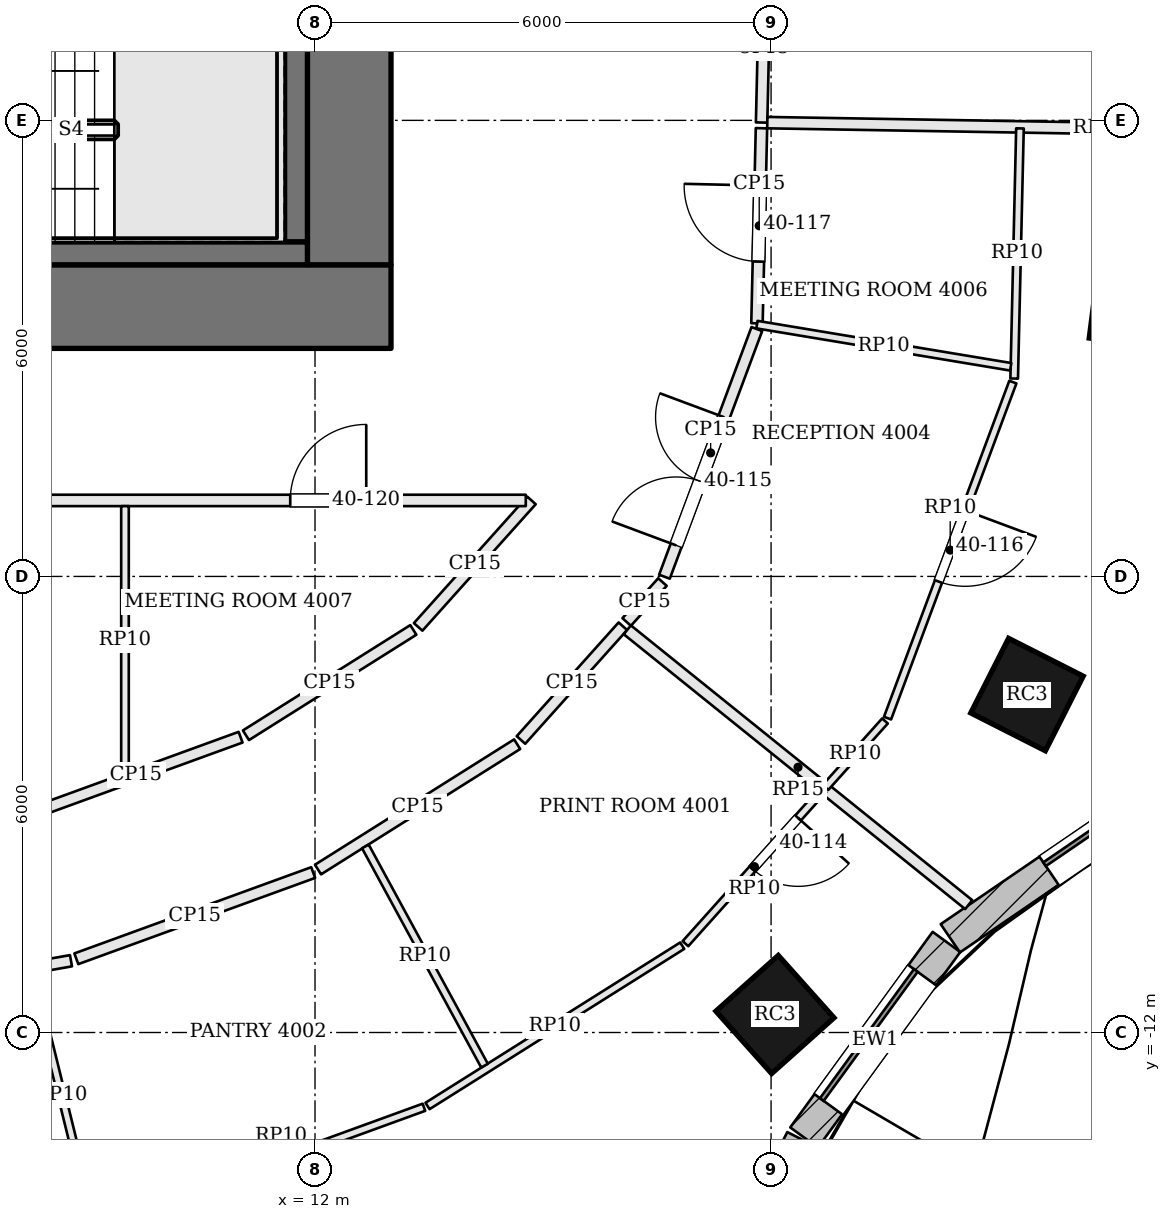
"""IFC4 building model, lengths in metres.
Left out: names, types, materials, properties, quantities, classifications, styles, units other than length and angle.
Written with IfcOpenShell. Run it as: python <this file> out.ifc"""

import sys

from ifc_helpers import new_model, si_unit, direction, frame, frame_2d, origin, origin_2d, place, context, subcontext, project, spatial, rectangle, extrude, element, fill, save


model = new_model("IFC4")
c1 = context("Model", 3, precision=1e-05, world=origin(), true_north=direction((0.0, 1.0)))
c2 = subcontext(c1, "Body", "Model", "MODEL_VIEW")
j1 = project(units=[si_unit("LENGTHUNIT", "METRE"), si_unit("PLANEANGLEUNIT", "RADIAN")], contexts=[c1])
p1 = place(None, origin())
s1 = spatial("IfcSite", under=j1, at=p1, CompositionType="ELEMENT")
p2 = place(p1, origin())
s2 = spatial("IfcBuilding", under=s1, at=p2, CompositionType="ELEMENT")
p3 = place(p2, frame((0.0, 0.0, 165.6)))
s3 = spatial("IfcBuildingStorey", under=s2, at=p3, CompositionType="ELEMENT", Elevation=165.6)
p4 = place(p3, frame((-13.0, -2.45, 0.0), z_axis=(0.0, 0.0, 1.0), x_axis=(1.0, 0.0, 0.0)))
e1 = element("IfcWall", 1, at=p4, inside=s3, PredefinedType="SHEAR", context=c2, shape_type="SweptSolid", body=[
    extrude(rectangle(XDim=26.0, YDim=1.1, at=frame_2d((13.0, 0.0))), origin(), (0.0, 0.0, 1.0), 3.9),
])
p5 = place(p4, frame((9.275, 0.0, 0.0)))
e2 = element("IfcOpeningElement", 2, at=p5, cuts=e1, PredefinedType="OPENING", context=c2, shape_type="SweptSolid", body=[
    extrude(rectangle(XDim=0.9, YDim=2.1, at=frame_2d((0.45, 1.05))), frame((0.0, 0.56, 0.0), z_axis=(0.0, -1.0, 0.0), x_axis=(1.0, 0.0, 0.0)), (0.0, 0.0, 1.0), 1.12),
])
p6 = place(p4, frame((12.525, 0.0, 0.0)))
e3 = element("IfcOpeningElement", 3, at=p6, cuts=e1, PredefinedType="OPENING", context=c2, shape_type="SweptSolid", body=[
    extrude(rectangle(XDim=0.9, YDim=2.1, at=frame_2d((0.45, 1.05))), frame((0.0, 0.56, 0.0), z_axis=(0.0, -1.0, 0.0), x_axis=(1.0, 0.0, 0.0)), (0.0, 0.0, 1.0), 1.12),
])
p7 = place(p4, frame((15.0, 0.0, 0.0)))
e4 = element("IfcOpeningElement", 4, at=p7, cuts=e1, PredefinedType="OPENING", context=c2, shape_type="SweptSolid", body=[
    extrude(rectangle(XDim=1.0, YDim=2.1, at=frame_2d((0.5, 1.05))), frame((0.0, 0.56, 0.0), z_axis=(0.0, -1.0, 0.0), x_axis=(1.0, 0.0, 0.0)), (0.0, 0.0, 1.0), 1.12),
])
p8 = place(p4, frame((16.7, 0.0, 0.0)))
e5 = element("IfcOpeningElement", 5, at=p8, cuts=e1, PredefinedType="OPENING", context=c2, shape_type="SweptSolid", body=[
    extrude(rectangle(XDim=0.9, YDim=2.1, at=frame_2d((0.45, 1.05))), frame((0.0, 0.56, 0.0), z_axis=(0.0, -1.0, 0.0), x_axis=(1.0, 0.0, 0.0)), (0.0, 0.0, 1.0), 1.12),
])
p9 = place(p3, frame((12.45, -1.9, 0.0), z_axis=(0.0, 0.0, 1.0), x_axis=(0.0, 1.0, 0.0)))
e6 = element("IfcWall", 6, at=p9, inside=s3, PredefinedType="SHEAR", context=c2, shape_type="SweptSolid", body=[
    extrude(rectangle(XDim=12.8, YDim=1.1, at=frame_2d((6.4, 0.0))), origin(), (0.0, 0.0, 1.0), 3.9),
])
p10 = place(p9, frame((7.1, 0.0, 0.0)))
e7 = element("IfcOpeningElement", 7, at=p10, cuts=e6, PredefinedType="OPENING", context=c2, shape_type="SweptSolid", body=[
    extrude(rectangle(XDim=1.8, YDim=2.1, at=frame_2d((0.9, 1.05))), frame((0.0, 0.56, 0.0), z_axis=(0.0, -1.0, 0.0), x_axis=(1.0, 0.0, 0.0)), (0.0, 0.0, 1.0), 1.12),
])
for number, where, z_axis, x_axis in (
    (8, (18.051, -11.763, 0.0), (0.0, 0.0, 1.0), (0.746, 0.666, 0.0)),
    (9, (21.367, -7.554, 0.0), (0.0, 0.0, 1.0), (0.452, 0.892, 0.0)),
    (10, (22.802, -2.389, 0.0), (0.0, 0.0, 1.0), (0.129, 0.992, 0.0)),
):
    element("IfcColumn", number, at=place(p3, frame(where, z_axis=z_axis, x_axis=x_axis)), inside=s3, PredefinedType="COLUMN", context=c2, shape_type="SweptSolid", body=[
        extrude(rectangle(XDim=1.1, YDim=1.1, at=origin_2d()), origin(), (0.0, 0.0, 1.0), 3.1),
    ])
p11 = place(p3, frame((16.697, -16.788, 0.0), z_axis=(0.0, 0.0, 1.0), x_axis=(0.453390768189, 0.891311848525, 0.0)))
e11 = element("IfcWall", 11, at=p11, inside=s3, PredefinedType="SOLIDWALL", context=c2, shape_type="SweptSolid", body=[
    extrude(rectangle(XDim=3.788, YDim=0.45, at=frame_2d((1.894, 0.0))), origin(), (0.0, 0.0, 1.0), 3.6),
])
p12 = place(p11, frame((0.844, 0.0, 0.9)))
e12 = element("IfcOpeningElement", 12, at=p12, cuts=e11, PredefinedType="OPENING", context=c2, shape_type="SweptSolid", body=[
    extrude(rectangle(XDim=2.1, YDim=1.8, at=frame_2d((1.05, 0.9))), frame((0.0, 0.235, 0.0), z_axis=(0.0, -1.0, 0.0), x_axis=(1.0, 0.0, 0.0)), (0.0, 0.0, 1.0), 0.47),
])
p13 = place(p3, frame((18.434, -13.381, 0.0), z_axis=(0.0, 0.0, 1.0), x_axis=(0.58867331001, 0.808371037384, 0.0)))
e13 = element("IfcWall", 13, at=p13, inside=s3, PredefinedType="SOLIDWALL", context=c2, shape_type="SweptSolid", body=[
    extrude(rectangle(XDim=3.183, YDim=0.45, at=frame_2d((1.591, 0.0))), origin(), (0.0, 0.0, 1.0), 3.6),
])
p14 = place(p13, frame((0.541, 0.0, 0.9)))
e14 = element("IfcOpeningElement", 14, at=p14, cuts=e13, PredefinedType="OPENING", context=c2, shape_type="SweptSolid", body=[
    extrude(rectangle(XDim=2.1, YDim=1.8, at=frame_2d((1.05, 0.9))), frame((0.0, 0.235, 0.0), z_axis=(0.0, -1.0, 0.0), x_axis=(1.0, 0.0, 0.0)), (0.0, 0.0, 1.0), 0.47),
])
p15 = place(p3, frame((20.359, -10.76, 0.0), z_axis=(0.0, 0.0, 1.0), x_axis=(0.825616460661, 0.564231743068, 0.0)))
e15 = element("IfcWall", 15, at=p15, inside=s3, PredefinedType="SOLIDWALL", context=c2, shape_type="SweptSolid", body=[
    extrude(rectangle(XDim=5.246, YDim=0.45, at=frame_2d((2.623, 0.0))), origin(), (0.0, 0.0, 1.0), 3.6),
])
p16 = place(p15, frame((1.573, 0.0, 0.9)))
e16 = element("IfcOpeningElement", 16, at=p16, cuts=e15, PredefinedType="OPENING", context=c2, shape_type="SweptSolid", body=[
    extrude(rectangle(XDim=2.1, YDim=1.8, at=frame_2d((1.05, 0.9))), frame((0.0, 0.235, 0.0), z_axis=(0.0, -1.0, 0.0), x_axis=(1.0, 0.0, 0.0)), (0.0, 0.0, 1.0), 0.47),
])
p17 = place(p3, frame((11.75, 1.35, 0.0), z_axis=(0.0, 0.0, 1.0), x_axis=(0.0, -1.0, 0.0)))
e17 = element("IfcWall", 17, at=p17, inside=s3, PredefinedType="SOLIDWALL", context=c2, shape_type="SweptSolid", body=[
    extrude(rectangle(XDim=2.95, YDim=0.3, at=frame_2d((1.475, 0.0))), origin(), (0.0, 0.0, 1.0), 3.6),
])
p18 = place(p3, frame((11.9, -1.75, 0.0), z_axis=(0.0, 0.0, 1.0), x_axis=(-1.0, 0.0, 0.0)))
e18 = element("IfcWall", 18, at=p18, inside=s3, PredefinedType="SOLIDWALL", context=c2, shape_type="SweptSolid", body=[
    extrude(rectangle(XDim=6.8, YDim=0.3, at=frame_2d((3.4, 0.0))), origin(), (0.0, 0.0, 1.0), 3.6),
])
p19 = place(p3, frame((17.875, -0.028, 0.0), z_axis=(0.0, 0.0, 1.0), x_axis=(0.023087091456, 0.999733457582, 0.0)))
e19 = element("IfcWall", 19, at=p19, inside=s3, PredefinedType="PARTITIONING", context=c2, shape_type="SweptSolid", body=[
    extrude(rectangle(XDim=1.956, YDim=0.15, at=frame_2d((0.978, 0.0))), origin(), (0.0, 0.0, 1.0), 3.098),
])
p20 = place(p3, frame((26.677, -0.177, 0.0), z_axis=(0.0, 0.0, 1.0), x_axis=(-0.999857756393, 0.016866148966, 0.0)))
e20 = element("IfcWall", 20, at=p20, inside=s3, PredefinedType="PARTITIONING", context=c2, shape_type="SweptSolid", body=[
    extrude(rectangle(XDim=8.729, YDim=0.15, at=frame_2d((4.364, 0.0))), origin(), (0.0, 0.0, 1.0), 3.19),
])
p21 = place(p3, frame((4.594, -11.799, 0.0), z_axis=(0.0, 0.0, 1.0), x_axis=(0.984693444773, 0.174295208833, 0.0)))
e21 = element("IfcWall", 21, at=p21, inside=s3, PredefinedType="PARTITIONING", context=c2, shape_type="SweptSolid", body=[
    extrude(rectangle(XDim=4.261, YDim=0.15, at=frame_2d((2.13, 0.0))), origin(), (0.0, 0.0, 1.0), 3.098),
])
p22 = place(p21, frame((0.45, 0.0, 0.0)))
e22 = element("IfcOpeningElement", 22, at=p22, cuts=e21, PredefinedType="OPENING", context=c2, shape_type="SweptSolid", body=[
    extrude(rectangle(XDim=1.0, YDim=2.4, at=frame_2d((0.5, 1.2))), frame((0.0, 0.085, 0.0), z_axis=(0.0, -1.0, 0.0), x_axis=(1.0, 0.0, 0.0)), (0.0, 0.0, 1.0), 0.17),
])
p23 = place(p3, frame((8.86, -11.03, 0.0), z_axis=(0.0, 0.0, 1.0), x_axis=(0.939685902536, 0.342038601001, 0.0)))
e23 = element("IfcWall", 23, at=p23, inside=s3, PredefinedType="PARTITIONING", context=c2, shape_type="SweptSolid", body=[
    extrude(rectangle(XDim=3.316, YDim=0.15, at=frame_2d((1.658, 0.0))), origin(), (0.0, 0.0, 1.0), 3.098),
])
p24 = place(p3, frame((12.04, -9.856, 0.0), z_axis=(0.0, 0.0, 1.0), x_axis=(0.846394809937, 0.532555936697, 0.0)))
e24 = element("IfcWall", 24, at=p24, inside=s3, PredefinedType="PARTITIONING", context=c2, shape_type="SweptSolid", body=[
    extrude(rectangle(XDim=3.095, YDim=0.15, at=frame_2d((1.548, 0.0))), origin(), (0.0, 0.0, 1.0), 3.098),
])
p25 = place(p3, frame((14.709, -8.152, 0.0), z_axis=(0.0, 0.0, 1.0), x_axis=(0.667345221437, 0.744748518243, 0.0)))
e25 = element("IfcWall", 25, at=p25, inside=s3, PredefinedType="PARTITIONING", context=c2, shape_type="SweptSolid", body=[
    extrude(rectangle(XDim=2.009, YDim=0.15, at=frame_2d((1.005, 0.0))), origin(), (0.0, 0.0, 1.0), 3.098),
])
p26 = place(p3, frame((20.6, -10.318, 0.0), z_axis=(0.0, 0.0, 1.0), x_axis=(-0.778973348429, 0.627057032842, 0.0)))
e26 = element("IfcWall", 26, at=p26, inside=s3, PredefinedType="PARTITIONING", context=c2, shape_type="SweptSolid", body=[
    extrude(rectangle(XDim=5.766, YDim=0.15, at=frame_2d((2.883, 0.0))), origin(), (0.0, 0.0, 1.0), 3.19),
])
p27 = place(p3, frame((16.1, -6.599, 0.0), z_axis=(0.0, 0.0, 1.0), x_axis=(0.667300297025, 0.744788771122, 0.0)))
e27 = element("IfcWall", 27, at=p27, inside=s3, PredefinedType="PARTITIONING", context=c2, shape_type="SweptSolid", body=[
    extrude(rectangle(XDim=0.706, YDim=0.15, at=frame_2d((0.353, 0.0))), origin(), (0.0, 0.0, 1.0), 3.098),
])
p28 = place(p3, frame((16.597, -6.003, 0.0), z_axis=(0.0, 0.0, 1.0), x_axis=(0.349499455299, 0.936936567088, 0.0)))
e28 = element("IfcWall", 28, at=p28, inside=s3, PredefinedType="PARTITIONING", context=c2, shape_type="SweptSolid", body=[
    extrude(rectangle(XDim=3.477, YDim=0.15, at=frame_2d((1.739, 0.0))), origin(), (0.0, 0.0, 1.0), 3.098),
])
p29 = place(p28, frame((0.44, 0.0, 0.0)))
e29 = element("IfcOpeningElement", 29, at=p29, cuts=e28, PredefinedType="OPENING", context=c2, shape_type="SweptSolid", body=[
    extrude(rectangle(XDim=1.8, YDim=2.1, at=frame_2d((0.9, 1.05))), frame((0.0, 0.085, 0.0), z_axis=(0.0, -1.0, 0.0), x_axis=(1.0, 0.0, 0.0)), (0.0, 0.0, 1.0), 0.17),
])
p30 = place(p3, frame((17.814, -2.67, 0.0), z_axis=(0.0, 0.0, 1.0), x_axis=(0.023010835286, 0.999735215674, 0.0)))
e30 = element("IfcWall", 30, at=p30, inside=s3, PredefinedType="PARTITIONING", context=c2, shape_type="SweptSolid", body=[
    extrude(rectangle(XDim=2.568, YDim=0.15, at=frame_2d((1.284, 0.0))), origin(), (0.0, 0.0, 1.0), 3.098),
])
p31 = place(p30, frame((0.813, 0.0, 0.0)))
e31 = element("IfcOpeningElement", 31, at=p31, cuts=e30, PredefinedType="OPENING", context=c2, shape_type="SweptSolid", body=[
    extrude(rectangle(XDim=1.0, YDim=2.4, at=frame_2d((0.5, 1.2))), frame((0.0, 0.085, 0.0), z_axis=(0.0, -1.0, 0.0), x_axis=(1.0, 0.0, 0.0)), (0.0, 0.0, 1.0), 0.17),
])
p32 = place(p3, frame((14.848, -5.0, 0.0), z_axis=(0.0, 0.0, 1.0), x_axis=(-0.667363249373, -0.744732363595, 0.0)))
e32 = element("IfcWall", 32, at=p32, inside=s3, PredefinedType="PARTITIONING", context=c2, shape_type="SweptSolid", body=[
    extrude(rectangle(XDim=2.234, YDim=0.15, at=frame_2d((1.117, 0.0))), origin(), (0.0, 0.0, 1.0), 3.098),
])
p33 = place(p3, frame((13.293, -6.704, 0.0), z_axis=(0.0, 0.0, 1.0), x_axis=(-0.84641299998, -0.532527026041, 0.0)))
e33 = element("IfcWall", 33, at=p33, inside=s3, PredefinedType="PARTITIONING", context=c2, shape_type="SweptSolid", body=[
    extrude(rectangle(XDim=2.602, YDim=0.15, at=frame_2d((1.301, 0.0))), origin(), (0.0, 0.0, 1.0), 3.098),
])
p34 = place(p3, frame((11.021, -8.115, 0.0), z_axis=(0.0, 0.0, 1.0), x_axis=(-0.939683845313, -0.342044252778, 0.0)))
e34 = element("IfcWall", 34, at=p34, inside=s3, PredefinedType="PARTITIONING", context=c2, shape_type="SweptSolid", body=[
    extrude(rectangle(XDim=2.929, YDim=0.15, at=frame_2d((1.464, 0.0))), origin(), (0.0, 0.0, 1.0), 3.098),
])
p35 = place(p3, frame((-14.789, -5.0, 0.0), z_axis=(0.0, 0.0, 1.0), x_axis=(1.0, 0.0, 0.0)))
e35 = element("IfcWall", 35, at=p35, inside=s3, PredefinedType="PARTITIONING", context=c2, shape_type="SweptSolid", body=[
    extrude(rectangle(XDim=29.562, YDim=0.15, at=frame_2d((14.781, 0.0))), origin(), (0.0, 0.0, 1.0), 3.098),
])
p36 = place(p35, frame((2.107, 0.0, 0.0)))
e36 = element("IfcOpeningElement", 36, at=p36, cuts=e35, PredefinedType="OPENING", context=c2, shape_type="SweptSolid", body=[
    extrude(rectangle(XDim=1.0, YDim=2.1, at=frame_2d((0.5, 1.05))), frame((0.0, 0.085, 0.0), z_axis=(0.0, -1.0, 0.0), x_axis=(1.0, 0.0, 0.0)), (0.0, 0.0, 1.0), 0.17),
])
p37 = place(p35, frame((13.889, 0.0, 0.0)))
e37 = element("IfcOpeningElement", 37, at=p37, cuts=e35, PredefinedType="OPENING", context=c2, shape_type="SweptSolid", body=[
    extrude(rectangle(XDim=1.8, YDim=2.1, at=frame_2d((0.9, 1.05))), frame((0.0, 0.085, 0.0), z_axis=(0.0, -1.0, 0.0), x_axis=(1.0, 0.0, 0.0)), (0.0, 0.0, 1.0), 0.17),
])
p38 = place(p35, frame((26.463, 0.0, 0.0)))
e38 = element("IfcOpeningElement", 38, at=p38, cuts=e35, PredefinedType="OPENING", context=c2, shape_type="SweptSolid", body=[
    extrude(rectangle(XDim=1.0, YDim=2.4, at=frame_2d((0.5, 1.2))), frame((0.0, 0.085, 0.0), z_axis=(0.0, -1.0, 0.0), x_axis=(1.0, 0.0, 0.0)), (0.0, 0.0, 1.0), 0.17),
])
p39 = place(p3, frame((18.689, -8.805, 0.0), z_axis=(0.0, 0.0, 1.0), x_axis=(-0.667327137391, -0.74476472238, 0.0)))
e39 = element("IfcWall", 39, at=p39, inside=s3, PredefinedType="PARTITIONING", context=c2, shape_type="SweptSolid", body=[
    extrude(rectangle(XDim=2.721, YDim=0.1, at=frame_2d((1.36, 0.0))), origin(), (0.0, 0.0, 1.0), 3.084),
])
p40 = place(p39, frame((0.5, 0.0, 0.0)))
e40 = element("IfcOpeningElement", 40, at=p40, cuts=e39, PredefinedType="OPENING", context=c2, shape_type="SweptSolid", body=[
    extrude(rectangle(XDim=0.9, YDim=2.1, at=frame_2d((0.45, 1.05))), frame((0.0, 0.06, 0.0), z_axis=(0.0, -1.0, 0.0), x_axis=(1.0, 0.0, 0.0)), (0.0, 0.0, 1.0), 0.12),
])
p41 = place(p3, frame((16.831, -10.858, 0.0), z_axis=(0.0, 0.0, 1.0), x_axis=(-0.846415033443, -0.532523793987, 0.0)))
e41 = element("IfcWall", 41, at=p41, inside=s3, PredefinedType="PARTITIONING", context=c2, shape_type="SweptSolid", body=[
    extrude(rectangle(XDim=3.96, YDim=0.1, at=frame_2d((1.98, 0.0))), origin(), (0.0, 0.0, 1.0), 3.084),
])
p42 = place(p3, frame((13.433, -12.984, 0.0), z_axis=(0.0, 0.0, 1.0), x_axis=(-0.939673979614, -0.342071355182, 0.0)))
e42 = element("IfcWall", 42, at=p42, inside=s3, PredefinedType="PARTITIONING", context=c2, shape_type="SweptSolid", body=[
    extrude(rectangle(XDim=4.0, YDim=0.1, at=frame_2d((2.0, 0.0))), origin(), (0.0, 0.0, 1.0), 3.084),
])
p43 = place(p42, frame((2.031, 0.0, 0.0)))
e43 = element("IfcOpeningElement", 43, at=p43, cuts=e42, PredefinedType="OPENING", context=c2, shape_type="SweptSolid", body=[
    extrude(rectangle(XDim=0.9, YDim=2.1, at=frame_2d((0.45, 1.05))), frame((0.0, 0.06, 0.0), z_axis=(0.0, -1.0, 0.0), x_axis=(1.0, 0.0, 0.0)), (0.0, 0.0, 1.0), 0.12),
])
p44 = place(p3, frame((8.271, -11.223, 0.0), z_axis=(0.0, 0.0, 1.0), x_axis=(0.239472113502, -0.970903242787, 0.0)))
e44 = element("IfcWall", 44, at=p44, inside=s3, PredefinedType="PARTITIONING", context=c2, shape_type="SweptSolid", body=[
    extrude(rectangle(XDim=3.283, YDim=0.1, at=frame_2d((1.641, 0.0))), origin(), (0.0, 0.0, 1.0), 3.084),
])
p45 = place(p3, frame((12.663, -9.552, 0.0), z_axis=(0.0, 0.0, 1.0), x_axis=(0.477480862917, -0.878642148743, 0.0)))
e45 = element("IfcWall", 45, at=p45, inside=s3, PredefinedType="PARTITIONING", context=c2, shape_type="SweptSolid", body=[
    extrude(rectangle(XDim=3.282, YDim=0.1, at=frame_2d((1.641, 0.0))), origin(), (0.0, 0.0, 1.0), 3.084),
])
p46 = place(p3, frame((21.274, -0.106, 0.0), z_axis=(0.0, 0.0, 1.0), x_axis=(-0.023066789158, -0.999733926221, 0.0)))
e46 = element("IfcWall", 46, at=p46, inside=s3, PredefinedType="PARTITIONING", context=c2, shape_type="SweptSolid", body=[
    extrude(rectangle(XDim=3.292, YDim=0.1, at=frame_2d((1.646, 0.0))), origin(), (0.0, 0.0, 1.0), 3.084),
])
p47 = place(p3, frame((21.181, -3.443, 0.0), z_axis=(0.0, 0.0, 1.0), x_axis=(-0.349438657616, -0.936959243811, 0.0)))
e47 = element("IfcWall", 47, at=p47, inside=s3, PredefinedType="PARTITIONING", context=c2, shape_type="SweptSolid", body=[
    extrude(rectangle(XDim=4.718, YDim=0.1, at=frame_2d((2.359, 0.0))), origin(), (0.0, 0.0, 1.0), 3.084),
])
p48 = place(p47, frame((1.8, 0.0, 0.0)))
e48 = element("IfcOpeningElement", 48, at=p48, cuts=e47, PredefinedType="OPENING", context=c2, shape_type="SweptSolid", body=[
    extrude(rectangle(XDim=1.0, YDim=2.1, at=frame_2d((0.5, 1.05))), frame((0.0, 0.06, 0.0), z_axis=(0.0, -1.0, 0.0), x_axis=(1.0, 0.0, 0.0)), (0.0, 0.0, 1.0), 0.12),
])
p49 = place(p3, frame((19.499, -7.901, 0.0), z_axis=(0.0, 0.0, 1.0), x_axis=(-0.667342114275, -0.74475130246, 0.0)))
e49 = element("IfcWall", 49, at=p49, inside=s3, PredefinedType="PARTITIONING", context=c2, shape_type="SweptSolid", body=[
    extrude(rectangle(XDim=1.173, YDim=0.1, at=frame_2d((0.587, 0.0))), origin(), (0.0, 0.0, 1.0), 3.084),
])
p50 = place(p3, frame((17.814, -2.687, 0.0), z_axis=(0.0, 0.0, 1.0), x_axis=(0.986465965325, -0.163966152774, 0.0)))
e50 = element("IfcWall", 50, at=p50, inside=s3, PredefinedType="PARTITIONING", context=c2, shape_type="SweptSolid", body=[
    extrude(rectangle(XDim=3.385, YDim=0.1, at=frame_2d((1.692, 0.0))), origin(), (0.0, 0.0, 1.0), 3.084),
])
p51 = place(p3, frame((9.5, -8.594, 0.0), z_axis=(0.0, 0.0, 1.0), x_axis=(0.0, 1.0, 0.0)))
e51 = element("IfcWall", 51, at=p51, inside=s3, PredefinedType="PARTITIONING", context=c2, shape_type="SweptSolid", body=[
    extrude(rectangle(XDim=3.519, YDim=0.1, at=frame_2d((1.759, 0.0))), origin(), (0.0, 0.0, 1.0), 3.084),
])
p52 = place(p14, origin())
e52 = element("IfcWindow", 52, at=p52, inside=s3, PartitioningType="SINGLE_PANEL", PredefinedType="WINDOW", context=c2, shape_type="SweptSolid", body=[
    extrude(rectangle(XDim=2.1, YDim=1.8, at=frame_2d((1.05, 0.9))), frame((0.0, 0.135, 0.0), z_axis=(0.0, -1.0, 0.0), x_axis=(1.0, 0.0, 0.0)), (0.0, 0.0, 1.0), 0.06),
])
fill(e14, e52)
p53 = place(p16, origin())
e53 = element("IfcWindow", 53, at=p53, inside=s3, PartitioningType="SINGLE_PANEL", PredefinedType="WINDOW", context=c2, shape_type="SweptSolid", body=[
    extrude(rectangle(XDim=2.1, YDim=1.8, at=frame_2d((1.05, 0.9))), frame((0.0, 0.135, 0.0), z_axis=(0.0, -1.0, 0.0), x_axis=(1.0, 0.0, 0.0)), (0.0, 0.0, 1.0), 0.06),
])
fill(e16, e53)
p54 = place(p40, origin())
e54 = element("IfcDoor", 54, at=p54, inside=s3, OperationType="SINGLE_SWING_LEFT", PredefinedType="DOOR", context=c2, shape_type="SweptSolid", body=[
    extrude(rectangle(XDim=0.9, YDim=2.1, at=frame_2d((0.45, 1.05))), frame((0.0, 0.025, 0.0), z_axis=(0.0, -1.0, 0.0), x_axis=(1.0, 0.0, 0.0)), (0.0, 0.0, 1.0), 0.05),
])
fill(e40, e54)
p55 = place(p29, origin())
e55 = element("IfcDoor", 55, at=p55, inside=s3, OperationType="DOUBLE_DOOR_SINGLE_SWING", PredefinedType="DOOR", context=c2, shape_type="SweptSolid", body=[
    extrude(rectangle(XDim=1.8, YDim=2.1, at=frame_2d((0.9, 1.05))), frame((0.0, 0.025, 0.0), z_axis=(0.0, -1.0, 0.0), x_axis=(1.0, 0.0, 0.0)), (0.0, 0.0, 1.0), 0.05),
])
fill(e29, e55)
p56 = place(p48, origin())
e56 = element("IfcDoor", 56, at=p56, inside=s3, OperationType="SINGLE_SWING_LEFT", PredefinedType="DOOR", context=c2, shape_type="SweptSolid", body=[
    extrude(rectangle(XDim=1.0, YDim=2.1, at=frame_2d((0.5, 1.05))), frame((0.0, 0.025, 0.0), z_axis=(0.0, -1.0, 0.0), x_axis=(1.0, 0.0, 0.0)), (0.0, 0.0, 1.0), 0.05),
])
fill(e48, e56)
p57 = place(p31, origin())
e57 = element("IfcDoor", 57, at=p57, inside=s3, OperationType="SINGLE_SWING_RIGHT", PredefinedType="DOOR", context=c2, shape_type="SweptSolid", body=[
    extrude(rectangle(XDim=1.0, YDim=2.4, at=frame_2d((0.5, 1.2))), frame((0.0, 0.025, 0.0), z_axis=(0.0, -1.0, 0.0), x_axis=(1.0, 0.0, 0.0)), (0.0, 0.0, 1.0), 0.05),
])
fill(e31, e57)
p58 = place(p38, origin())
e58 = element("IfcDoor", 58, at=p58, inside=s3, OperationType="SINGLE_SWING_RIGHT", PredefinedType="DOOR", context=c2, shape_type="SweptSolid", body=[
    extrude(rectangle(XDim=1.0, YDim=2.4, at=frame_2d((0.5, 1.2))), frame((0.0, 0.025, 0.0), z_axis=(0.0, -1.0, 0.0), x_axis=(1.0, 0.0, 0.0)), (0.0, 0.0, 1.0), 0.05),
])
fill(e38, e58)
save(model, sys.argv[1])
